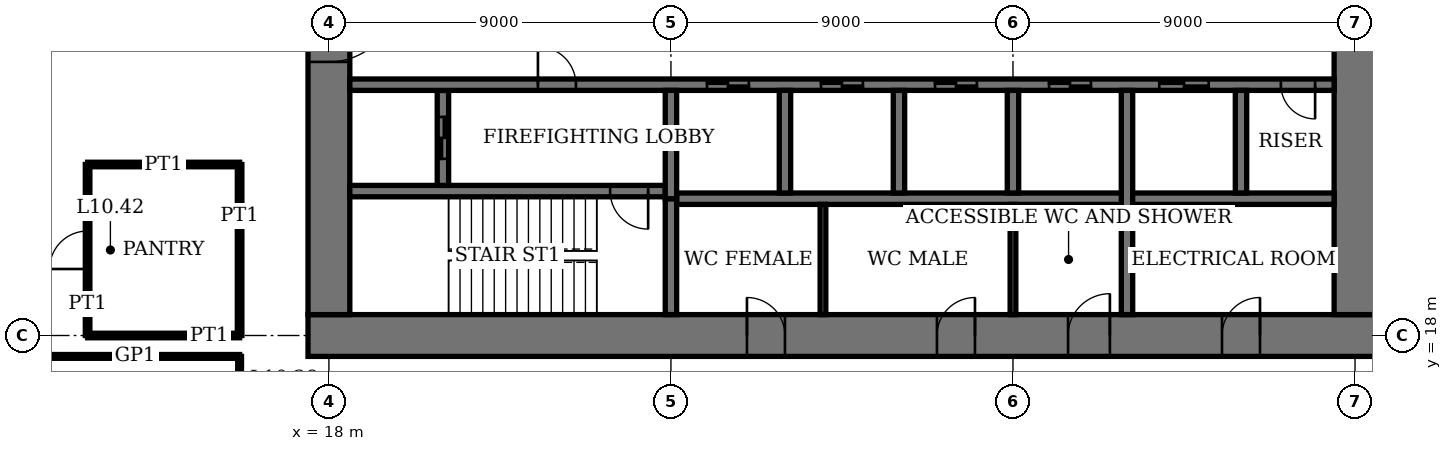
"""IFC4 building model, lengths in metres.
Left out: names, types, materials, properties, quantities, classifications, styles, units other than length and angle.
Written with IfcOpenShell. Run it as: python <this file> out.ifc"""

import sys

from ifc_helpers import new_model, si_unit, direction, frame, frame_2d, origin, place, context, subcontext, project, spatial, rectangle, extrude, element, fill, save


model = new_model("IFC4")
c1 = context("Model", 3, precision=1e-05, world=origin(), true_north=direction((0.0, 1.0)))
c2 = subcontext(c1, "Body", "Model", "MODEL_VIEW")
j1 = project(units=[si_unit("LENGTHUNIT", "METRE"), si_unit("PLANEANGLEUNIT", "RADIAN")], contexts=[c1])
p1 = place(None, origin())
s1 = spatial("IfcSite", under=j1, at=p1, CompositionType="ELEMENT")
p2 = place(p1, origin())
s2 = spatial("IfcBuilding", under=s1, at=p2, CompositionType="ELEMENT")
p3 = place(p2, frame((0.0, 0.0, 43.8)))
s3 = spatial("IfcBuildingStorey", under=s2, at=p3, CompositionType="ELEMENT", Elevation=43.8)
p4 = place(p3, frame((17.45, 18.0, 0.0), z_axis=(0.0, 0.0, 1.0), x_axis=(1.0, 0.0, 0.0)))
e1 = element("IfcWall", 1, at=p4, inside=s3, PredefinedType="SHEAR", context=c2, shape_type="SweptSolid", body=[
    extrude(rectangle(XDim=28.1, YDim=1.1, at=frame_2d((14.05, 0.0))), origin(), (0.0, 0.0, 1.0), 4.0),
])
p5 = place(p4, frame((11.55, 0.0, 0.0)))
e2 = element("IfcOpeningElement", 2, at=p5, cuts=e1, PredefinedType="OPENING", context=c2, shape_type="SweptSolid", body=[
    extrude(rectangle(XDim=1.0, YDim=2.4, at=frame_2d((0.5, 1.2))), frame((0.0, 0.56, 0.0), z_axis=(0.0, -1.0, 0.0), x_axis=(1.0, 0.0, 0.0)), (0.0, 0.0, 1.0), 1.12),
])
p6 = place(p4, frame((16.55, 0.0, 0.0)))
e3 = element("IfcOpeningElement", 3, at=p6, cuts=e1, PredefinedType="OPENING", context=c2, shape_type="SweptSolid", body=[
    extrude(rectangle(XDim=1.0, YDim=2.4, at=frame_2d((0.5, 1.2))), frame((0.0, 0.56, 0.0), z_axis=(0.0, -1.0, 0.0), x_axis=(1.0, 0.0, 0.0)), (0.0, 0.0, 1.0), 1.12),
])
p7 = place(p4, frame((20.0, 0.0, 0.0)))
e4 = element("IfcOpeningElement", 4, at=p7, cuts=e1, PredefinedType="OPENING", context=c2, shape_type="SweptSolid", body=[
    extrude(rectangle(XDim=1.1, YDim=2.4, at=frame_2d((0.55, 1.2))), frame((0.0, 0.56, 0.0), z_axis=(0.0, -1.0, 0.0), x_axis=(1.0, 0.0, 0.0)), (0.0, 0.0, 1.0), 1.12),
])
p8 = place(p4, frame((24.05, 0.0, 0.0)))
e5 = element("IfcOpeningElement", 5, at=p8, cuts=e1, PredefinedType="OPENING", context=c2, shape_type="SweptSolid", body=[
    extrude(rectangle(XDim=1.0, YDim=2.4, at=frame_2d((0.5, 1.2))), frame((0.0, 0.56, 0.0), z_axis=(0.0, -1.0, 0.0), x_axis=(1.0, 0.0, 0.0)), (0.0, 0.0, 1.0), 1.12),
])
p9 = place(p3, frame((18.0, 35.45, 0.0), z_axis=(0.0, 0.0, 1.0), x_axis=(0.0, -1.0, 0.0)))
e6 = element("IfcWall", 6, at=p9, inside=s3, PredefinedType="SHEAR", context=c2, shape_type="SweptSolid", body=[
    extrude(rectangle(XDim=16.9, YDim=1.1, at=frame_2d((8.45, 0.0))), origin(), (0.0, 0.0, 1.0), 4.0),
])
p10 = place(p9, frame((8.45, 0.0, 0.0)))
e7 = element("IfcOpeningElement", 7, at=p10, cuts=e6, PredefinedType="OPENING", context=c2, shape_type="SweptSolid", body=[
    extrude(rectangle(XDim=1.8, YDim=2.4, at=frame_2d((0.9, 1.2))), frame((0.0, 0.56, 0.0), z_axis=(0.0, -1.0, 0.0), x_axis=(1.0, 0.0, 0.0)), (0.0, 0.0, 1.0), 1.12),
])
p11 = place(p3, frame((45.0, 18.55, 0.0), z_axis=(0.0, 0.0, 1.0), x_axis=(0.0, 1.0, 0.0)))
e8 = element("IfcWall", 8, at=p11, inside=s3, PredefinedType="SHEAR", context=c2, shape_type="SweptSolid", body=[
    extrude(rectangle(XDim=16.9, YDim=1.1, at=frame_2d((8.45, 0.0))), origin(), (0.0, 0.0, 1.0), 4.0),
])
p12 = place(p11, frame((8.45, 0.0, 0.0)))
e9 = element("IfcOpeningElement", 9, at=p12, cuts=e8, PredefinedType="OPENING", context=c2, shape_type="SweptSolid", body=[
    extrude(rectangle(XDim=1.8, YDim=2.4, at=frame_2d((0.9, 1.2))), frame((0.0, 0.56, 0.0), z_axis=(0.0, -1.0, 0.0), x_axis=(1.0, 0.0, 0.0)), (0.0, 0.0, 1.0), 1.12),
])
p13 = place(p3, frame((18.55, 21.8, 0.0), z_axis=(0.0, 0.0, 1.0), x_axis=(1.0, 0.0, 0.0)))
e10 = element("IfcWall", 10, at=p13, inside=s3, PredefinedType="SHEAR", context=c2, shape_type="SweptSolid", body=[
    extrude(rectangle(XDim=8.3, YDim=0.3, at=frame_2d((4.15, 0.0))), origin(), (0.0, 0.0, 1.0), 4.0),
])
p14 = place(p13, frame((6.85, 0.0, 0.0)))
e11 = element("IfcOpeningElement", 11, at=p14, cuts=e10, PredefinedType="OPENING", context=c2, shape_type="SweptSolid", body=[
    extrude(rectangle(XDim=1.0, YDim=2.4, at=frame_2d((0.5, 1.2))), frame((0.0, 0.16, 0.0), z_axis=(0.0, -1.0, 0.0), x_axis=(1.0, 0.0, 0.0)), (0.0, 0.0, 1.0), 0.32),
])
p15 = place(p3, frame((27.0, 18.55, 0.0), z_axis=(0.0, 0.0, 1.0), x_axis=(0.0, 1.0, 0.0)))
e12 = element("IfcWall", 12, at=p15, inside=s3, PredefinedType="SHEAR", context=c2, shape_type="SweptSolid", body=[
    extrude(rectangle(XDim=3.05, YDim=0.3, at=frame_2d((1.525, 0.0))), origin(), (0.0, 0.0, 1.0), 4.0),
])
p16 = place(p3, frame((21.0, 21.95, 0.0), z_axis=(0.0, 0.0, 1.0), x_axis=(0.0, 1.0, 0.0)))
e13 = element("IfcWall", 13, at=p16, inside=s3, PredefinedType="SHEAR", context=c2, shape_type="SweptSolid", body=[
    extrude(rectangle(XDim=2.5, YDim=0.3, at=frame_2d((1.25, 0.0))), origin(), (0.0, 0.0, 1.0), 4.0),
])
p17 = place(p16, frame((0.7, 0.0, 0.0)))
e14 = element("IfcOpeningElement", 14, at=p17, cuts=e13, PredefinedType="OPENING", context=c2, shape_type="SweptSolid", body=[
    extrude(rectangle(XDim=1.1, YDim=2.4, at=frame_2d((0.55, 1.2))), frame((0.0, 0.16, 0.0), z_axis=(0.0, -1.0, 0.0), x_axis=(1.0, 0.0, 0.0)), (0.0, 0.0, 1.0), 0.32),
])
p18 = place(p3, frame((18.55, 24.6, 0.0), z_axis=(0.0, 0.0, 1.0), x_axis=(1.0, 0.0, 0.0)))
e15 = element("IfcWall", 15, at=p18, inside=s3, PredefinedType="SHEAR", context=c2, shape_type="SweptSolid", body=[
    extrude(rectangle(XDim=25.9, YDim=0.3, at=frame_2d((12.95, 0.0))), origin(), (0.0, 0.0, 1.0), 4.0),
])
p19 = place(p18, frame((4.95, 0.0, 0.0)))
e16 = element("IfcOpeningElement", 16, at=p19, cuts=e15, PredefinedType="OPENING", context=c2, shape_type="SweptSolid", body=[
    extrude(rectangle(XDim=1.0, YDim=2.4, at=frame_2d((0.5, 1.2))), frame((0.0, 0.16, 0.0), z_axis=(0.0, -1.0, 0.0), x_axis=(1.0, 0.0, 0.0)), (0.0, 0.0, 1.0), 0.32),
])
p20 = place(p18, frame((24.5, 0.0, 0.0)))
e17 = element("IfcOpeningElement", 17, at=p20, cuts=e15, PredefinedType="OPENING", context=c2, shape_type="SweptSolid", body=[
    extrude(rectangle(XDim=0.9, YDim=2.1, at=frame_2d((0.45, 1.05))), frame((0.0, 0.16, 0.0), z_axis=(0.0, -1.0, 0.0), x_axis=(1.0, 0.0, 0.0)), (0.0, 0.0, 1.0), 0.32),
])
p21 = place(p18, frame((9.4, 0.0, 0.0)))
e18 = element("IfcOpeningElement", 18, at=p21, cuts=e15, PredefinedType="OPENING", context=c2, shape_type="SweptSolid", body=[
    extrude(rectangle(XDim=1.1, YDim=2.4, at=frame_2d((0.55, 1.2))), frame((0.0, 0.16, 0.0), z_axis=(0.0, -1.0, 0.0), x_axis=(1.0, 0.0, 0.0)), (0.0, 0.0, 1.0), 0.32),
])
p22 = place(p18, frame((12.4, 0.0, 0.0)))
e19 = element("IfcOpeningElement", 19, at=p22, cuts=e15, PredefinedType="OPENING", context=c2, shape_type="SweptSolid", body=[
    extrude(rectangle(XDim=1.1, YDim=2.4, at=frame_2d((0.55, 1.2))), frame((0.0, 0.16, 0.0), z_axis=(0.0, -1.0, 0.0), x_axis=(1.0, 0.0, 0.0)), (0.0, 0.0, 1.0), 0.32),
])
p23 = place(p18, frame((15.4, 0.0, 0.0)))
e20 = element("IfcOpeningElement", 20, at=p23, cuts=e15, PredefinedType="OPENING", context=c2, shape_type="SweptSolid", body=[
    extrude(rectangle(XDim=1.1, YDim=2.4, at=frame_2d((0.55, 1.2))), frame((0.0, 0.16, 0.0), z_axis=(0.0, -1.0, 0.0), x_axis=(1.0, 0.0, 0.0)), (0.0, 0.0, 1.0), 0.32),
])
p24 = place(p18, frame((18.4, 0.0, 0.0)))
e21 = element("IfcOpeningElement", 21, at=p24, cuts=e15, PredefinedType="OPENING", context=c2, shape_type="SweptSolid", body=[
    extrude(rectangle(XDim=1.1, YDim=2.4, at=frame_2d((0.55, 1.2))), frame((0.0, 0.16, 0.0), z_axis=(0.0, -1.0, 0.0), x_axis=(1.0, 0.0, 0.0)), (0.0, 0.0, 1.0), 0.32),
])
p25 = place(p18, frame((21.3, 0.0, 0.0)))
e22 = element("IfcOpeningElement", 22, at=p25, cuts=e15, PredefinedType="OPENING", context=c2, shape_type="SweptSolid", body=[
    extrude(rectangle(XDim=1.3, YDim=2.4, at=frame_2d((0.65, 1.2))), frame((0.0, 0.16, 0.0), z_axis=(0.0, -1.0, 0.0), x_axis=(1.0, 0.0, 0.0)), (0.0, 0.0, 1.0), 0.32),
])
p26 = place(p3, frame((27.15, 21.6, 0.0), z_axis=(0.0, 0.0, 1.0), x_axis=(1.0, 0.0, 0.0)))
e23 = element("IfcWall", 23, at=p26, inside=s3, PredefinedType="SHEAR", context=c2, shape_type="SweptSolid", body=[
    extrude(rectangle(XDim=17.3, YDim=0.3, at=frame_2d((8.65, 0.0))), origin(), (0.0, 0.0, 1.0), 4.0),
])
for number, where, z_axis, x_axis in (
    (24, (30.0, 21.75, 0.0), (0.0, 0.0, 1.0), (0.0, 1.0, 0.0)),
    (25, (33.0, 21.75, 0.0), (0.0, 0.0, 1.0), (0.0, 1.0, 0.0)),
    (26, (36.0, 21.75, 0.0), (0.0, 0.0, 1.0), (0.0, 1.0, 0.0)),
):
    element("IfcWall", number, at=place(p3, frame(where, z_axis=z_axis, x_axis=x_axis)), inside=s3, PredefinedType="SHEAR", context=c2, shape_type="SweptSolid", body=[
        extrude(rectangle(XDim=2.7, YDim=0.3, at=frame_2d((1.35, 0.0))), origin(), (0.0, 0.0, 1.0), 4.0),
    ])
p27 = place(p3, frame((39.0, 18.55, 0.0), z_axis=(0.0, 0.0, 1.0), x_axis=(0.0, 1.0, 0.0)))
e27 = element("IfcWall", 27, at=p27, inside=s3, PredefinedType="SHEAR", context=c2, shape_type="SweptSolid", body=[
    extrude(rectangle(XDim=5.9, YDim=0.3, at=frame_2d((2.95, 0.0))), origin(), (0.0, 0.0, 1.0), 4.0),
])
p28 = place(p3, frame((42.0, 21.75, 0.0), z_axis=(0.0, 0.0, 1.0), x_axis=(0.0, 1.0, 0.0)))
e28 = element("IfcWall", 28, at=p28, inside=s3, PredefinedType="SHEAR", context=c2, shape_type="SweptSolid", body=[
    extrude(rectangle(XDim=2.7, YDim=0.3, at=frame_2d((1.35, 0.0))), origin(), (0.0, 0.0, 1.0), 4.0),
])
p29 = place(p3, frame((27.0, 21.6, 0.0), z_axis=(0.0, 0.0, 1.0), x_axis=(0.0, 1.0, 0.0)))
e29 = element("IfcWall", 29, at=p29, inside=s3, PredefinedType="SHEAR", context=c2, shape_type="SweptSolid", body=[
    extrude(rectangle(XDim=2.85, YDim=0.3, at=frame_2d((1.425, 0.0))), origin(), (0.0, 0.0, 1.0), 4.0),
])
p30 = place(p3, frame((10.15, 17.45, 0.0), z_axis=(0.0, 0.0, 1.0), x_axis=(1.0, 0.0, 0.0)))
e30 = element("IfcWall", 30, at=p30, inside=s3, PredefinedType="PARTITIONING", context=c2, shape_type="SweptSolid", body=[
    extrude(rectangle(XDim=5.5, YDim=0.1, at=frame_2d((2.75, 0.0))), origin(), (0.0, 0.0, 1.0), 3.75),
])
p31 = place(p3, frame((11.65, 18.0, 0.0), z_axis=(0.0, 0.0, 1.0), x_axis=(1.0, 0.0, 0.0)))
e31 = element("IfcWall", 31, at=p31, inside=s3, PredefinedType="PARTITIONING", context=c2, shape_type="SweptSolid", body=[
    extrude(rectangle(XDim=4.0, YDim=0.12, at=frame_2d((2.0, 0.0))), origin(), (0.0, 0.0, 1.0), 3.05),
])
p32 = place(p3, frame((11.65, 22.5, 0.0), z_axis=(0.0, 0.0, 1.0), x_axis=(1.0, 0.0, 0.0)))
e32 = element("IfcWall", 32, at=p32, inside=s3, PredefinedType="PARTITIONING", context=c2, shape_type="SweptSolid", body=[
    extrude(rectangle(XDim=4.0, YDim=0.12, at=frame_2d((2.0, 0.0))), origin(), (0.0, 0.0, 1.0), 3.1),
])
p33 = place(p3, frame((11.65, 18.0, 0.0), z_axis=(0.0, 0.0, 1.0), x_axis=(0.0, 1.0, 0.0)))
e33 = element("IfcWall", 33, at=p33, inside=s3, PredefinedType="PARTITIONING", context=c2, shape_type="SweptSolid", body=[
    extrude(rectangle(XDim=4.5, YDim=0.12, at=frame_2d((2.25, 0.0))), origin(), (0.0, 0.0, 1.0), 3.75),
])
p34 = place(p33, frame((1.75, 0.0, 0.0)))
e34 = element("IfcOpeningElement", 34, at=p34, cuts=e33, PredefinedType="OPENING", context=c2, shape_type="SweptSolid", body=[
    extrude(rectangle(XDim=1.0, YDim=2.4, at=frame_2d((0.5, 1.2))), frame((0.0, 0.07, 0.0), z_axis=(0.0, -1.0, 0.0), x_axis=(1.0, 0.0, 0.0)), (0.0, 0.0, 1.0), 0.14),
])
p35 = place(p3, frame((15.65, 18.0, 0.0), z_axis=(0.0, 0.0, 1.0), x_axis=(0.0, 1.0, 0.0)))
e35 = element("IfcWall", 35, at=p35, inside=s3, PredefinedType="PARTITIONING", context=c2, shape_type="SweptSolid", body=[
    extrude(rectangle(XDim=4.5, YDim=0.12, at=frame_2d((2.25, 0.0))), origin(), (0.0, 0.0, 1.0), 3.75),
])
p36 = place(p3, frame((15.65, 15.65, 0.0), z_axis=(0.0, 0.0, 1.0), x_axis=(0.0, 1.0, 0.0)))
e36 = element("IfcWall", 36, at=p36, inside=s3, PredefinedType="PARTITIONING", context=c2, shape_type="SweptSolid", body=[
    extrude(rectangle(XDim=1.8, YDim=0.1, at=frame_2d((0.9, 0.0))), origin(), (0.0, 0.0, 1.0), 3.75),
])
for number, where, z_axis, x_axis in (
    (37, (31.0, 18.55, 0.0), (0.0, 0.0, 1.0), (0.0, 1.0, 0.0)),
    (38, (36.0, 18.55, 0.0), (0.0, 0.0, 1.0), (0.0, 1.0, 0.0)),
):
    element("IfcWall", number, at=place(p3, frame(where, z_axis=z_axis, x_axis=x_axis)), inside=s3, PredefinedType="PARTITIONING", context=c2, shape_type="SweptSolid", body=[
        extrude(rectangle(XDim=2.9, YDim=0.15, at=frame_2d((1.45, 0.0))), origin(), (0.0, 0.0, 1.0), 3.75),
    ])
p37 = place(p10, origin())
e39 = element("IfcDoor", 39, at=p37, inside=s3, OperationType="DOUBLE_DOOR_DOUBLE_SWING", PredefinedType="DOOR", context=c2, shape_type="SweptSolid", body=[
    extrude(rectangle(XDim=1.8, YDim=2.4, at=frame_2d((0.9, 1.2))), frame((0.0, 0.03, 0.0), z_axis=(0.0, -1.0, 0.0), x_axis=(1.0, 0.0, 0.0)), (0.0, 0.0, 1.0), 0.06),
    extrude(rectangle(XDim=0.04, YDim=2.4, at=frame_2d((0.02, 1.2))), frame((0.0, 0.55, 0.0), z_axis=(0.0, -1.0, 0.0), x_axis=(1.0, 0.0, 0.0)), (0.0, 0.0, 1.0), 1.1),
    extrude(rectangle(XDim=0.04, YDim=2.4, at=frame_2d((1.78, 1.2))), frame((0.0, 0.55, 0.0), z_axis=(0.0, -1.0, 0.0), x_axis=(1.0, 0.0, 0.0)), (0.0, 0.0, 1.0), 1.1),
    extrude(rectangle(XDim=1.8, YDim=0.04, at=frame_2d((0.9, 2.38))), frame((0.0, 0.55, 0.0), z_axis=(0.0, -1.0, 0.0), x_axis=(1.0, 0.0, 0.0)), (0.0, 0.0, 1.0), 1.1),
])
fill(e7, e39)
p38 = place(p5, origin())
e40 = element("IfcDoor", 40, at=p38, inside=s3, OperationType="SINGLE_SWING_RIGHT", PredefinedType="DOOR", context=c2, shape_type="SweptSolid", body=[
    extrude(rectangle(XDim=1.0, YDim=2.4, at=frame_2d((0.5, 1.2))), frame((0.0, 0.025, 0.0), z_axis=(0.0, -1.0, 0.0), x_axis=(1.0, 0.0, 0.0)), (0.0, 0.0, 1.0), 0.05),
    extrude(rectangle(XDim=0.04, YDim=2.4, at=frame_2d((0.02, 1.2))), frame((0.0, 0.4, 0.0), z_axis=(0.0, -1.0, 0.0), x_axis=(1.0, 0.0, 0.0)), (0.0, 0.0, 1.0), 0.8),
    extrude(rectangle(XDim=0.04, YDim=2.4, at=frame_2d((0.98, 1.2))), frame((0.0, 0.4, 0.0), z_axis=(0.0, -1.0, 0.0), x_axis=(1.0, 0.0, 0.0)), (0.0, 0.0, 1.0), 0.8),
    extrude(rectangle(XDim=1.0, YDim=0.04, at=frame_2d((0.5, 2.38))), frame((0.0, 0.4, 0.0), z_axis=(0.0, -1.0, 0.0), x_axis=(1.0, 0.0, 0.0)), (0.0, 0.0, 1.0), 0.8),
])
fill(e2, e40)
p39 = place(p6, origin())
e41 = element("IfcDoor", 41, at=p39, inside=s3, OperationType="SINGLE_SWING_LEFT", PredefinedType="DOOR", context=c2, shape_type="SweptSolid", body=[
    extrude(rectangle(XDim=1.0, YDim=2.4, at=frame_2d((0.5, 1.2))), frame((0.0, 0.025, 0.0), z_axis=(0.0, -1.0, 0.0), x_axis=(1.0, 0.0, 0.0)), (0.0, 0.0, 1.0), 0.05),
    extrude(rectangle(XDim=0.04, YDim=2.4, at=frame_2d((0.02, 1.2))), frame((0.0, 0.4, 0.0), z_axis=(0.0, -1.0, 0.0), x_axis=(1.0, 0.0, 0.0)), (0.0, 0.0, 1.0), 0.8),
    extrude(rectangle(XDim=0.04, YDim=2.4, at=frame_2d((0.98, 1.2))), frame((0.0, 0.4, 0.0), z_axis=(0.0, -1.0, 0.0), x_axis=(1.0, 0.0, 0.0)), (0.0, 0.0, 1.0), 0.8),
    extrude(rectangle(XDim=1.0, YDim=0.04, at=frame_2d((0.5, 2.38))), frame((0.0, 0.4, 0.0), z_axis=(0.0, -1.0, 0.0), x_axis=(1.0, 0.0, 0.0)), (0.0, 0.0, 1.0), 0.8),
])
fill(e3, e41)
p40 = place(p7, origin())
e42 = element("IfcDoor", 42, at=p40, inside=s3, OperationType="SINGLE_SWING_LEFT", PredefinedType="DOOR", context=c2, shape_type="SweptSolid", body=[
    extrude(rectangle(XDim=1.1, YDim=2.4, at=frame_2d((0.55, 1.2))), frame((0.0, 0.025, 0.0), z_axis=(0.0, -1.0, 0.0), x_axis=(1.0, 0.0, 0.0)), (0.0, 0.0, 1.0), 0.05),
    extrude(rectangle(XDim=0.04, YDim=2.4, at=frame_2d((0.02, 1.2))), frame((0.0, 0.44, 0.0), z_axis=(0.0, -1.0, 0.0), x_axis=(1.0, 0.0, 0.0)), (0.0, 0.0, 1.0), 0.88),
    extrude(rectangle(XDim=0.04, YDim=2.4, at=frame_2d((1.08, 1.2))), frame((0.0, 0.44, 0.0), z_axis=(0.0, -1.0, 0.0), x_axis=(1.0, 0.0, 0.0)), (0.0, 0.0, 1.0), 0.88),
    extrude(rectangle(XDim=1.1, YDim=0.04, at=frame_2d((0.55, 2.38))), frame((0.0, 0.44, 0.0), z_axis=(0.0, -1.0, 0.0), x_axis=(1.0, 0.0, 0.0)), (0.0, 0.0, 1.0), 0.88),
])
fill(e4, e42)
p41 = place(p8, origin())
e43 = element("IfcDoor", 43, at=p41, inside=s3, OperationType="SINGLE_SWING_LEFT", PredefinedType="DOOR", context=c2, shape_type="SweptSolid", body=[
    extrude(rectangle(XDim=1.0, YDim=2.4, at=frame_2d((0.5, 1.2))), frame((0.0, 0.025, 0.0), z_axis=(0.0, -1.0, 0.0), x_axis=(1.0, 0.0, 0.0)), (0.0, 0.0, 1.0), 0.05),
    extrude(rectangle(XDim=0.04, YDim=2.4, at=frame_2d((0.02, 1.2))), frame((0.0, 0.4, 0.0), z_axis=(0.0, -1.0, 0.0), x_axis=(1.0, 0.0, 0.0)), (0.0, 0.0, 1.0), 0.8),
    extrude(rectangle(XDim=0.04, YDim=2.4, at=frame_2d((0.98, 1.2))), frame((0.0, 0.4, 0.0), z_axis=(0.0, -1.0, 0.0), x_axis=(1.0, 0.0, 0.0)), (0.0, 0.0, 1.0), 0.8),
    extrude(rectangle(XDim=1.0, YDim=0.04, at=frame_2d((0.5, 2.38))), frame((0.0, 0.4, 0.0), z_axis=(0.0, -1.0, 0.0), x_axis=(1.0, 0.0, 0.0)), (0.0, 0.0, 1.0), 0.8),
])
fill(e5, e43)
p42 = place(p14, origin())
e44 = element("IfcDoor", 44, at=p42, inside=s3, OperationType="SINGLE_SWING_RIGHT", PredefinedType="DOOR", context=c2, shape_type="SweptSolid", body=[
    extrude(rectangle(XDim=1.0, YDim=2.4, at=frame_2d((0.5, 1.2))), frame((0.0, 0.03, 0.0), z_axis=(0.0, -1.0, 0.0), x_axis=(1.0, 0.0, 0.0)), (0.0, 0.0, 1.0), 0.06),
])
fill(e11, e44)
p43 = place(p19, origin())
e45 = element("IfcDoor", 45, at=p43, inside=s3, OperationType="SINGLE_SWING_RIGHT", PredefinedType="DOOR", context=c2, shape_type="SweptSolid", body=[
    extrude(rectangle(XDim=1.0, YDim=2.4, at=frame_2d((0.5, 1.2))), frame((0.0, 0.03, 0.0), z_axis=(0.0, -1.0, 0.0), x_axis=(1.0, 0.0, 0.0)), (0.0, 0.0, 1.0), 0.06),
])
fill(e16, e45)
p44 = place(p20, origin())
e46 = element("IfcDoor", 46, at=p44, inside=s3, OperationType="SINGLE_SWING_RIGHT", PredefinedType="DOOR", context=c2, shape_type="SweptSolid", body=[
    extrude(rectangle(XDim=0.9, YDim=2.1, at=frame_2d((0.45, 1.05))), frame((0.0, 0.03, 0.0), z_axis=(0.0, -1.0, 0.0), x_axis=(1.0, 0.0, 0.0)), (0.0, 0.0, 1.0), 0.06),
])
fill(e17, e46)
p45 = place(p34, origin())
e47 = element("IfcDoor", 47, at=p45, inside=s3, OperationType="SINGLE_SWING_RIGHT", PredefinedType="DOOR", context=c2, shape_type="SweptSolid", body=[
    extrude(rectangle(XDim=1.0, YDim=2.4, at=frame_2d((0.5, 1.2))), frame((0.0, 0.025, 0.0), z_axis=(0.0, -1.0, 0.0), x_axis=(1.0, 0.0, 0.0)), (0.0, 0.0, 1.0), 0.05),
])
fill(e34, e47)
p46 = place(p21, origin())
e48 = element("IfcDoor", 48, at=p46, inside=s3, OperationType="DOUBLE_DOOR_SLIDING", PredefinedType="DOOR", context=c2, shape_type="SweptSolid", body=[
    extrude(rectangle(XDim=1.1, YDim=2.4, at=frame_2d((0.55, 1.2))), frame((0.0, 0.02, 0.0), z_axis=(0.0, -1.0, 0.0), x_axis=(1.0, 0.0, 0.0)), (0.0, 0.0, 1.0), 0.04),
])
fill(e18, e48)
p47 = place(p22, origin())
e49 = element("IfcDoor", 49, at=p47, inside=s3, OperationType="DOUBLE_DOOR_SLIDING", PredefinedType="DOOR", context=c2, shape_type="SweptSolid", body=[
    extrude(rectangle(XDim=1.1, YDim=2.4, at=frame_2d((0.55, 1.2))), frame((0.0, 0.02, 0.0), z_axis=(0.0, -1.0, 0.0), x_axis=(1.0, 0.0, 0.0)), (0.0, 0.0, 1.0), 0.04),
])
fill(e19, e49)
p48 = place(p23, origin())
e50 = element("IfcDoor", 50, at=p48, inside=s3, OperationType="DOUBLE_DOOR_SLIDING", PredefinedType="DOOR", context=c2, shape_type="SweptSolid", body=[
    extrude(rectangle(XDim=1.1, YDim=2.4, at=frame_2d((0.55, 1.2))), frame((0.0, 0.02, 0.0), z_axis=(0.0, -1.0, 0.0), x_axis=(1.0, 0.0, 0.0)), (0.0, 0.0, 1.0), 0.04),
])
fill(e20, e50)
p49 = place(p24, origin())
e51 = element("IfcDoor", 51, at=p49, inside=s3, OperationType="DOUBLE_DOOR_SLIDING", PredefinedType="DOOR", context=c2, shape_type="SweptSolid", body=[
    extrude(rectangle(XDim=1.1, YDim=2.4, at=frame_2d((0.55, 1.2))), frame((0.0, 0.02, 0.0), z_axis=(0.0, -1.0, 0.0), x_axis=(1.0, 0.0, 0.0)), (0.0, 0.0, 1.0), 0.04),
])
fill(e21, e51)
p50 = place(p25, origin())
e52 = element("IfcDoor", 52, at=p50, inside=s3, OperationType="DOUBLE_DOOR_SLIDING", PredefinedType="DOOR", context=c2, shape_type="SweptSolid", body=[
    extrude(rectangle(XDim=1.3, YDim=2.4, at=frame_2d((0.65, 1.2))), frame((0.0, 0.02, 0.0), z_axis=(0.0, -1.0, 0.0), x_axis=(1.0, 0.0, 0.0)), (0.0, 0.0, 1.0), 0.04),
])
fill(e22, e52)
p51 = place(p17, origin())
e53 = element("IfcDoor", 53, at=p51, inside=s3, OperationType="DOUBLE_DOOR_SLIDING", PredefinedType="DOOR", context=c2, shape_type="SweptSolid", body=[
    extrude(rectangle(XDim=1.1, YDim=2.4, at=frame_2d((0.55, 1.2))), frame((0.0, 0.03, 0.0), z_axis=(0.0, -1.0, 0.0), x_axis=(1.0, 0.0, 0.0)), (0.0, 0.0, 1.0), 0.06),
])
fill(e14, e53)
save(model, sys.argv[1])
